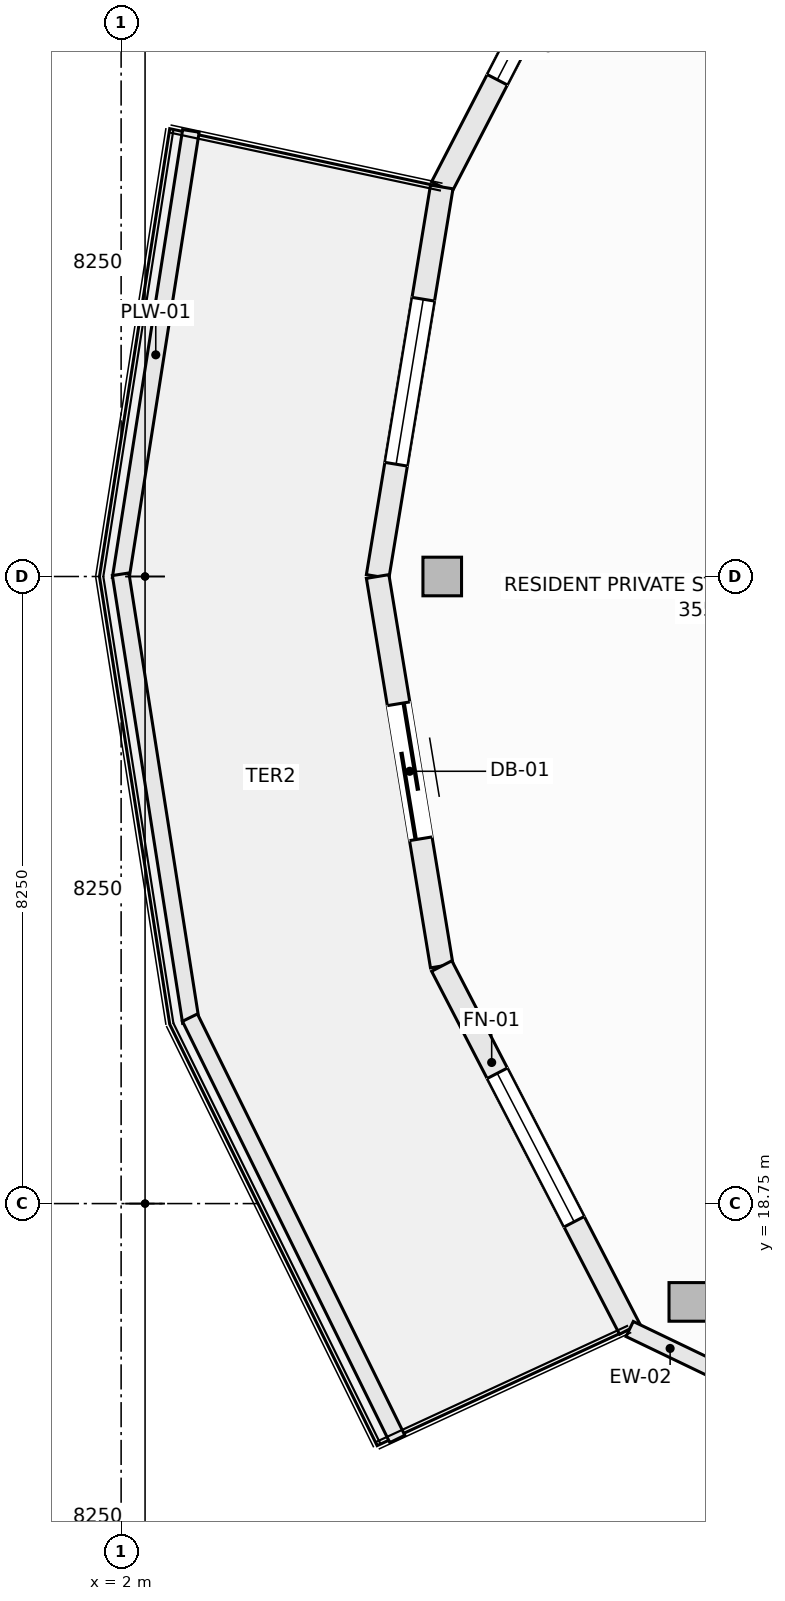
"""IFC4 building model, lengths in metres.
Left out: names, types, materials, properties, quantities, classifications, styles, units other than length and angle.
Written with IfcOpenShell. Run it as: python <this file> out.ifc"""

import sys

from ifc_helpers import new_model, si_unit, direction, frame, frame_2d, origin, origin_2d, place, context, subcontext, project, spatial, rectangle, hollow_rectangle, extrude, element, fill, save


model = new_model("IFC4")
c1 = context("Model", 3, precision=1e-05, world=origin(), true_north=direction((0.0, 1.0)))
c2 = subcontext(c1, "Body", "Model", "MODEL_VIEW")
j1 = project(units=[si_unit("LENGTHUNIT", "METRE"), si_unit("PLANEANGLEUNIT", "RADIAN")], contexts=[c1])
p1 = place(None, origin())
s1 = spatial("IfcSite", under=j1, at=p1, CompositionType="ELEMENT")
p2 = place(p1, origin())
s2 = spatial("IfcBuilding", under=s1, at=p2, CompositionType="ELEMENT")
p3 = place(p2, frame((0.0, 0.0, 212.9)))
s3 = spatial("IfcBuildingStorey", under=s2, at=p3, CompositionType="ELEMENT", Elevation=212.9)
for number, where, z_axis, x_axis in (
    (1, (6.225, 27.0, -0.27), (0.0, 0.0, 1.0), (1.0, 0.0, 0.0)),
    (2, (9.463, 17.456, -0.27), (0.0, 0.0, 1.0), (1.0, 0.0, 0.0)),
):
    element("IfcColumn", number, at=place(p3, frame(where, z_axis=z_axis, x_axis=x_axis)), inside=s3, PredefinedType="COLUMN", context=c2, shape_type="SweptSolid", body=[
        extrude(hollow_rectangle(XDim=0.508, YDim=0.508, WallThickness=0.019, at=origin_2d()), origin(), (0.0, 0.0, 1.0), 3.3),
    ])
p4 = place(p3, frame((6.218, 32.125, 0.0), z_axis=(0.0, 0.0, 1.0), x_axis=(0.459808219482, 0.888018243786, 0.0)))
e3 = element("IfcWall", 3, at=p4, inside=s3, PredefinedType="SOLIDWALL", context=c2, shape_type="SweptSolid", body=[
    extrude(rectangle(XDim=5.378, YDim=0.3, at=frame_2d((2.689, 0.0))), origin(), (0.0, 0.0, 1.0), 2.605),
])
p5 = place(p4, frame((1.589, 0.0, 0.72)))
e4 = element("IfcOpeningElement", 4, at=p5, cuts=e3, PredefinedType="OPENING", context=c2, shape_type="SweptSolid", body=[
    extrude(rectangle(XDim=2.2, YDim=1.65, at=frame_2d((1.1, 0.825))), frame((0.0, 0.16, 0.0), z_axis=(0.0, -1.0, 0.0), x_axis=(1.0, 0.0, 0.0)), (0.0, 0.0, 1.0), 0.32),
])
p6 = place(p3, frame((5.375, 27.0, 0.0), z_axis=(0.0, 0.0, 1.0), x_axis=(0.16237087798, 0.986729799886, 0.0)))
e5 = element("IfcWall", 5, at=p6, inside=s3, PredefinedType="SOLIDWALL", context=c2, shape_type="SweptSolid", body=[
    extrude(rectangle(XDim=5.193, YDim=0.3, at=frame_2d((2.597, 0.0))), origin(), (0.0, 0.0, 1.0), 2.605),
])
p7 = place(p6, frame((1.497, 0.0, 0.72)))
e6 = element("IfcOpeningElement", 6, at=p7, cuts=e5, PredefinedType="OPENING", context=c2, shape_type="SweptSolid", body=[
    extrude(rectangle(XDim=2.2, YDim=1.65, at=frame_2d((1.1, 0.825))), frame((0.0, 0.16, 0.0), z_axis=(0.0, -1.0, 0.0), x_axis=(1.0, 0.0, 0.0)), (0.0, 0.0, 1.0), 0.32),
])
p8 = place(p3, frame((5.375, 27.0, 0.0), z_axis=(0.0, 0.0, 1.0), x_axis=(0.16237087798, -0.986729799886, 0.0)))
e7 = element("IfcWall", 7, at=p8, inside=s3, PredefinedType="SOLIDWALL", context=c2, shape_type="SweptSolid", body=[
    extrude(rectangle(XDim=5.193, YDim=0.3, at=frame_2d((2.597, 0.0))), origin(), (0.0, 0.0, 1.0), 2.605),
])
p9 = place(p8, frame((1.697, 0.0, 0.0)))
e8 = element("IfcOpeningElement", 8, at=p9, cuts=e7, PredefinedType="OPENING", context=c2, shape_type="SweptSolid", body=[
    extrude(rectangle(XDim=1.8, YDim=2.25, at=frame_2d((0.9, 1.125))), frame((0.0, 0.16, 0.0), z_axis=(0.0, -1.0, 0.0), x_axis=(1.0, 0.0, 0.0)), (0.0, 0.0, 1.0), 0.32),
])
p10 = place(p3, frame((6.218, 21.875, 0.0), z_axis=(0.0, 0.0, 1.0), x_axis=(0.459808219482, -0.888018243786, 0.0)))
e9 = element("IfcWall", 9, at=p10, inside=s3, PredefinedType="SOLIDWALL", context=c2, shape_type="SweptSolid", body=[
    extrude(rectangle(XDim=5.378, YDim=0.3, at=frame_2d((2.689, 0.0))), origin(), (0.0, 0.0, 1.0), 2.605),
])
p11 = place(p10, frame((1.589, 0.0, 0.72)))
e10 = element("IfcOpeningElement", 10, at=p11, cuts=e9, PredefinedType="OPENING", context=c2, shape_type="SweptSolid", body=[
    extrude(rectangle(XDim=2.2, YDim=1.65, at=frame_2d((1.1, 0.825))), frame((0.0, 0.16, 0.0), z_axis=(0.0, -1.0, 0.0), x_axis=(1.0, 0.0, 0.0)), (0.0, 0.0, 1.0), 0.32),
])
p12 = place(p3, frame((8.691, 17.1, 0.0), z_axis=(0.0, 0.0, 1.0), x_axis=(0.901264843027, -0.433268603437, 0.0)))
e11 = element("IfcWall", 11, at=p12, inside=s3, PredefinedType="SOLIDWALL", context=c2, shape_type="SweptSolid", body=[
    extrude(rectangle(XDim=1.181, YDim=0.22, at=frame_2d((0.591, 0.0))), origin(), (0.0, 0.0, 1.0), 2.605),
])
for number, where, z_axis, x_axis in (
    (12, (1.993, 26.971, 0.0), (0.0, 0.0, 1.0), (0.155, 0.988, 0.0)),
    (13, (1.993, 27.029, 0.0), (0.0, 0.0, 1.0), (0.155, -0.988, 0.0)),
):
    element("IfcWall", number, at=place(p3, frame(where, z_axis=z_axis, x_axis=x_axis)), inside=s3, PredefinedType="PARAPET", context=c2, shape_type="SweptSolid", body=[
        extrude(rectangle(XDim=5.964, YDim=0.22, at=frame_2d((2.982, 0.0))), origin(), (0.0, 0.0, 1.0), 0.52),
    ])
p13 = place(p3, frame((2.906, 21.196, 0.0), z_axis=(0.0, 0.0, 1.0), x_axis=(0.441640961804, -0.897191875162, 0.0)))
e14 = element("IfcWall", 14, at=p13, inside=s3, PredefinedType="PARAPET", context=c2, shape_type="SweptSolid", body=[
    extrude(rectangle(XDim=6.178, YDim=0.22, at=frame_2d((3.089, 0.0))), origin(), (0.0, 0.0, 1.0), 0.52),
])
p14 = place(p5, origin())
e15 = element("IfcWindow", 15, at=p14, inside=s3, PartitioningType="SINGLE_PANEL", PredefinedType="WINDOW", context=c2, shape_type="SweptSolid", body=[
    extrude(rectangle(XDim=2.2, YDim=1.65, at=frame_2d((1.1, 0.825))), frame((0.0, 0.03, 0.0), z_axis=(0.0, -1.0, 0.0), x_axis=(1.0, 0.0, 0.0)), (0.0, 0.0, 1.0), 0.06),
])
fill(e4, e15)
p15 = place(p7, origin())
e16 = element("IfcWindow", 16, at=p15, inside=s3, PartitioningType="SINGLE_PANEL", PredefinedType="WINDOW", context=c2, shape_type="SweptSolid", body=[
    extrude(rectangle(XDim=2.2, YDim=1.65, at=frame_2d((1.1, 0.825))), frame((0.0, 0.03, 0.0), z_axis=(0.0, -1.0, 0.0), x_axis=(1.0, 0.0, 0.0)), (0.0, 0.0, 1.0), 0.06),
])
fill(e6, e16)
p16 = place(p9, frame((1.8, 0.0, 0.0), z_axis=(0.0, 0.0, 1.0), x_axis=(-1.0, 0.0, 0.0)))
e17 = element("IfcDoor", 17, at=p16, inside=s3, OperationType="SLIDING_TO_LEFT", PredefinedType="DOOR", context=c2, shape_type="SweptSolid", body=[
    extrude(rectangle(XDim=1.8, YDim=2.25, at=frame_2d((0.9, 1.125))), frame((0.0, 0.025, 0.0), z_axis=(0.0, -1.0, 0.0), x_axis=(1.0, 0.0, 0.0)), (0.0, 0.0, 1.0), 0.05),
])
fill(e8, e17)
p17 = place(p11, origin())
e18 = element("IfcWindow", 18, at=p17, inside=s3, PartitioningType="SINGLE_PANEL", PredefinedType="WINDOW", context=c2, shape_type="SweptSolid", body=[
    extrude(rectangle(XDim=2.2, YDim=1.65, at=frame_2d((1.1, 0.825))), frame((0.0, 0.03, 0.0), z_axis=(0.0, -1.0, 0.0), x_axis=(1.0, 0.0, 0.0)), (0.0, 0.0, 1.0), 0.06),
])
fill(e10, e18)
save(model, sys.argv[1])
